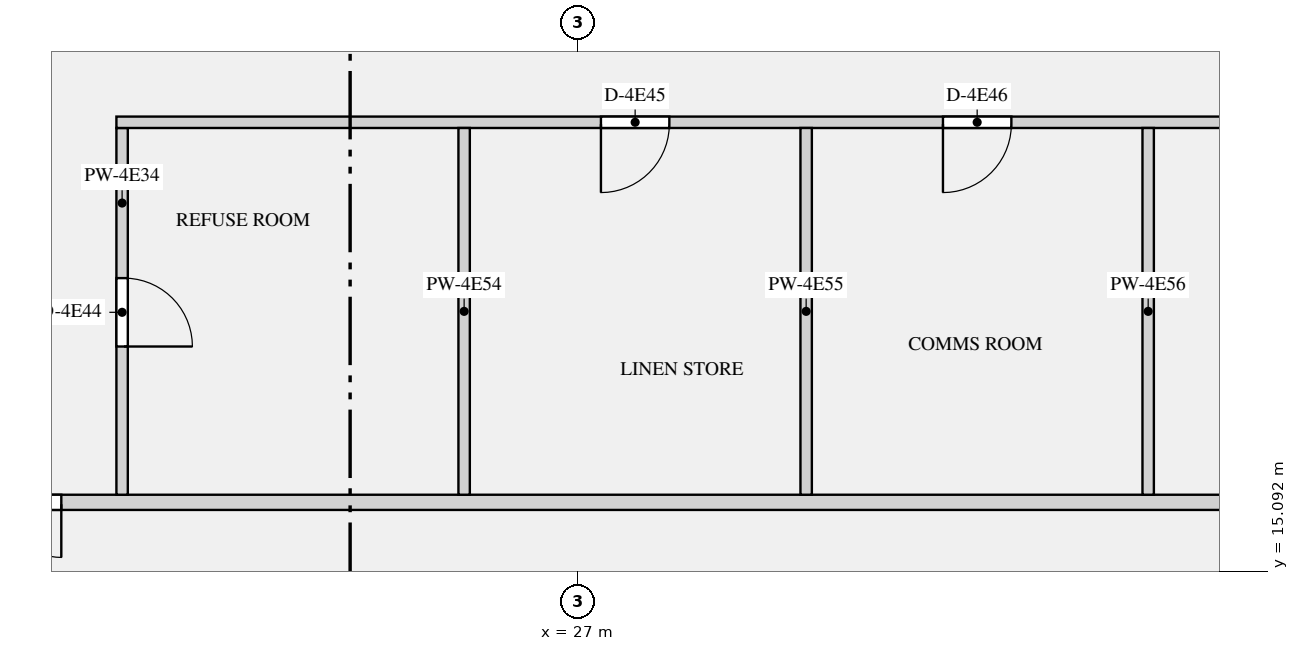
"""IFC4 building model, lengths in metres.
Left out: names, types, materials, properties, quantities, classifications, styles, units other than length and angle.
Written with IfcOpenShell. Run it as: python <this file> out.ifc"""

import sys

from ifc_helpers import new_model, si_unit, direction, frame, frame_2d, origin, place, context, subcontext, project, spatial, rectangle, extrude, element, fill, save


model = new_model("IFC4")
c1 = context("Model", 3, precision=1e-05, world=origin(), true_north=direction((0.0, 1.0)))
c2 = subcontext(c1, "Body", "Model", "MODEL_VIEW")
j1 = project(units=[si_unit("LENGTHUNIT", "METRE"), si_unit("PLANEANGLEUNIT", "RADIAN")], contexts=[c1])
p1 = place(None, origin())
s1 = spatial("IfcSite", under=j1, at=p1, CompositionType="ELEMENT")
p2 = place(p1, origin())
s2 = spatial("IfcBuilding", under=s1, at=p2, CompositionType="ELEMENT")
p3 = place(p2, frame((0.0, 0.0, 232.65)))
s3 = spatial("IfcBuildingStorey", under=s2, at=p3, CompositionType="ELEMENT", Elevation=232.65)
p4 = place(p3, frame((20.925, 21.0, 0.0), z_axis=(0.0, 0.0, 1.0), x_axis=(1.0, 0.0, 0.0)))
e1 = element("IfcWall", 1, at=p4, inside=s3, PredefinedType="PARTITIONING", context=c2, shape_type="SweptSolid", body=[
    extrude(rectangle(XDim=30.15, YDim=0.15, at=frame_2d((15.075, 0.0))), origin(), (0.0, 0.0, 1.0), 2.8),
])
p5 = place(p4, frame((6.375, 0.0, 0.0)))
e2 = element("IfcOpeningElement", 2, at=p5, cuts=e1, PredefinedType="OPENING", context=c2, shape_type="SweptSolid", body=[
    extrude(rectangle(XDim=0.9, YDim=2.1, at=frame_2d((0.45, 1.05))), frame((0.0, 0.085, 0.0), z_axis=(0.0, -1.0, 0.0), x_axis=(1.0, 0.0, 0.0)), (0.0, 0.0, 1.0), 0.17),
])
p6 = place(p4, frame((10.875, 0.0, 0.0)))
e3 = element("IfcOpeningElement", 3, at=p6, cuts=e1, PredefinedType="OPENING", context=c2, shape_type="SweptSolid", body=[
    extrude(rectangle(XDim=0.9, YDim=2.1, at=frame_2d((0.45, 1.05))), frame((0.0, 0.085, 0.0), z_axis=(0.0, -1.0, 0.0), x_axis=(1.0, 0.0, 0.0)), (0.0, 0.0, 1.0), 0.17),
])
p7 = place(p4, frame((16.875, 0.0, 0.0)))
e4 = element("IfcOpeningElement", 4, at=p7, cuts=e1, PredefinedType="OPENING", context=c2, shape_type="SweptSolid", body=[
    extrude(rectangle(XDim=0.9, YDim=2.1, at=frame_2d((0.45, 1.05))), frame((0.0, 0.085, 0.0), z_axis=(0.0, -1.0, 0.0), x_axis=(1.0, 0.0, 0.0)), (0.0, 0.0, 1.0), 0.17),
])
p8 = place(p4, frame((22.875, 0.0, 0.0)))
e5 = element("IfcOpeningElement", 5, at=p8, cuts=e1, PredefinedType="OPENING", context=c2, shape_type="SweptSolid", body=[
    extrude(rectangle(XDim=0.9, YDim=2.1, at=frame_2d((0.45, 1.05))), frame((0.0, 0.085, 0.0), z_axis=(0.0, -1.0, 0.0), x_axis=(1.0, 0.0, 0.0)), (0.0, 0.0, 1.0), 0.17),
])
p9 = place(p3, frame((17.9, 16.0, 0.0), z_axis=(0.0, 0.0, 1.0), x_axis=(1.0, 0.0, 0.0)))
e6 = element("IfcWall", 6, at=p9, inside=s3, PredefinedType="PARTITIONING", context=c2, shape_type="SweptSolid", body=[
    extrude(rectangle(XDim=36.2, YDim=0.2, at=frame_2d((18.1, 0.0))), origin(), (0.0, 0.0, 1.0), 2.8),
])
p10 = place(p9, frame((0.9, 0.0, 0.0)))
e7 = element("IfcOpeningElement", 7, at=p10, cuts=e6, PredefinedType="OPENING", context=c2, shape_type="SweptSolid", body=[
    extrude(rectangle(XDim=1.4, YDim=2.1, at=frame_2d((0.7, 1.05))), frame((0.0, 0.11, 0.0), z_axis=(0.0, -1.0, 0.0), x_axis=(1.0, 0.0, 0.0)), (0.0, 0.0, 1.0), 0.22),
])
p11 = place(p9, frame((33.9, 0.0, 0.0)))
e8 = element("IfcOpeningElement", 8, at=p11, cuts=e6, PredefinedType="OPENING", context=c2, shape_type="SweptSolid", body=[
    extrude(rectangle(XDim=1.4, YDim=2.1, at=frame_2d((0.7, 1.05))), frame((0.0, 0.11, 0.0), z_axis=(0.0, -1.0, 0.0), x_axis=(1.0, 0.0, 0.0)), (0.0, 0.0, 1.0), 0.22),
])
p12 = place(p3, frame((21.0, 16.1, 0.0), z_axis=(0.0, 0.0, 1.0), x_axis=(0.0, 1.0, 0.0)))
e9 = element("IfcWall", 9, at=p12, inside=s3, PredefinedType="PARTITIONING", context=c2, shape_type="SweptSolid", body=[
    extrude(rectangle(XDim=4.825, YDim=0.15, at=frame_2d((2.413, 0.0))), origin(), (0.0, 0.0, 1.0), 2.8),
])
p13 = place(p12, frame((1.95, 0.0, 0.0)))
e10 = element("IfcOpeningElement", 10, at=p13, cuts=e9, PredefinedType="OPENING", context=c2, shape_type="SweptSolid", body=[
    extrude(rectangle(XDim=0.9, YDim=2.1, at=frame_2d((0.45, 1.05))), frame((0.0, 0.085, 0.0), z_axis=(0.0, -1.0, 0.0), x_axis=(1.0, 0.0, 0.0)), (0.0, 0.0, 1.0), 0.17),
])
for number, where, z_axis, x_axis in (
    (11, (25.5, 16.1, 0.0), (0.0, 0.0, 1.0), (0.0, 1.0, 0.0)),
    (12, (30.0, 16.1, 0.0), (0.0, 0.0, 1.0), (0.0, 1.0, 0.0)),
    (13, (34.5, 16.1, 0.0), (0.0, 0.0, 1.0), (0.0, 1.0, 0.0)),
):
    element("IfcWall", number, at=place(p3, frame(where, z_axis=z_axis, x_axis=x_axis)), inside=s3, PredefinedType="PARTITIONING", context=c2, shape_type="SweptSolid", body=[
        extrude(rectangle(XDim=4.825, YDim=0.15, at=frame_2d((2.413, 0.0))), origin(), (0.0, 0.0, 1.0), 2.8),
    ])
p14 = place(p10, frame((1.4, 0.0, 0.0), z_axis=(0.0, 0.0, 1.0), x_axis=(-1.0, 0.0, 0.0)))
e14 = element("IfcDoor", 14, at=p14, inside=s3, OperationType="DOUBLE_DOOR_SINGLE_SWING", PredefinedType="DOOR", context=c2, shape_type="SweptSolid", body=[
    extrude(rectangle(XDim=1.4, YDim=2.1, at=frame_2d((0.7, 1.05))), frame((0.0, 0.025, 0.0), z_axis=(0.0, -1.0, 0.0), x_axis=(1.0, 0.0, 0.0)), (0.0, 0.0, 1.0), 0.05),
])
fill(e7, e14)
p15 = place(p13, frame((0.9, 0.0, 0.0), z_axis=(0.0, 0.0, 1.0), x_axis=(-1.0, 0.0, 0.0)))
e15 = element("IfcDoor", 15, at=p15, inside=s3, OperationType="SINGLE_SWING_RIGHT", PredefinedType="DOOR", context=c2, shape_type="SweptSolid", body=[
    extrude(rectangle(XDim=0.9, YDim=2.1, at=frame_2d((0.45, 1.05))), frame((0.0, 0.025, 0.0), z_axis=(0.0, -1.0, 0.0), x_axis=(1.0, 0.0, 0.0)), (0.0, 0.0, 1.0), 0.05),
])
fill(e10, e15)
p16 = place(p5, frame((0.9, 0.0, 0.0), z_axis=(0.0, 0.0, 1.0), x_axis=(-1.0, 0.0, 0.0)))
e16 = element("IfcDoor", 16, at=p16, inside=s3, OperationType="SINGLE_SWING_RIGHT", PredefinedType="DOOR", context=c2, shape_type="SweptSolid", body=[
    extrude(rectangle(XDim=0.9, YDim=2.1, at=frame_2d((0.45, 1.05))), frame((0.0, 0.025, 0.0), z_axis=(0.0, -1.0, 0.0), x_axis=(1.0, 0.0, 0.0)), (0.0, 0.0, 1.0), 0.05),
])
fill(e2, e16)
p17 = place(p6, frame((0.9, 0.0, 0.0), z_axis=(0.0, 0.0, 1.0), x_axis=(-1.0, 0.0, 0.0)))
e17 = element("IfcDoor", 17, at=p17, inside=s3, OperationType="SINGLE_SWING_RIGHT", PredefinedType="DOOR", context=c2, shape_type="SweptSolid", body=[
    extrude(rectangle(XDim=0.9, YDim=2.1, at=frame_2d((0.45, 1.05))), frame((0.0, 0.025, 0.0), z_axis=(0.0, -1.0, 0.0), x_axis=(1.0, 0.0, 0.0)), (0.0, 0.0, 1.0), 0.05),
])
fill(e3, e17)
save(model, sys.argv[1])
